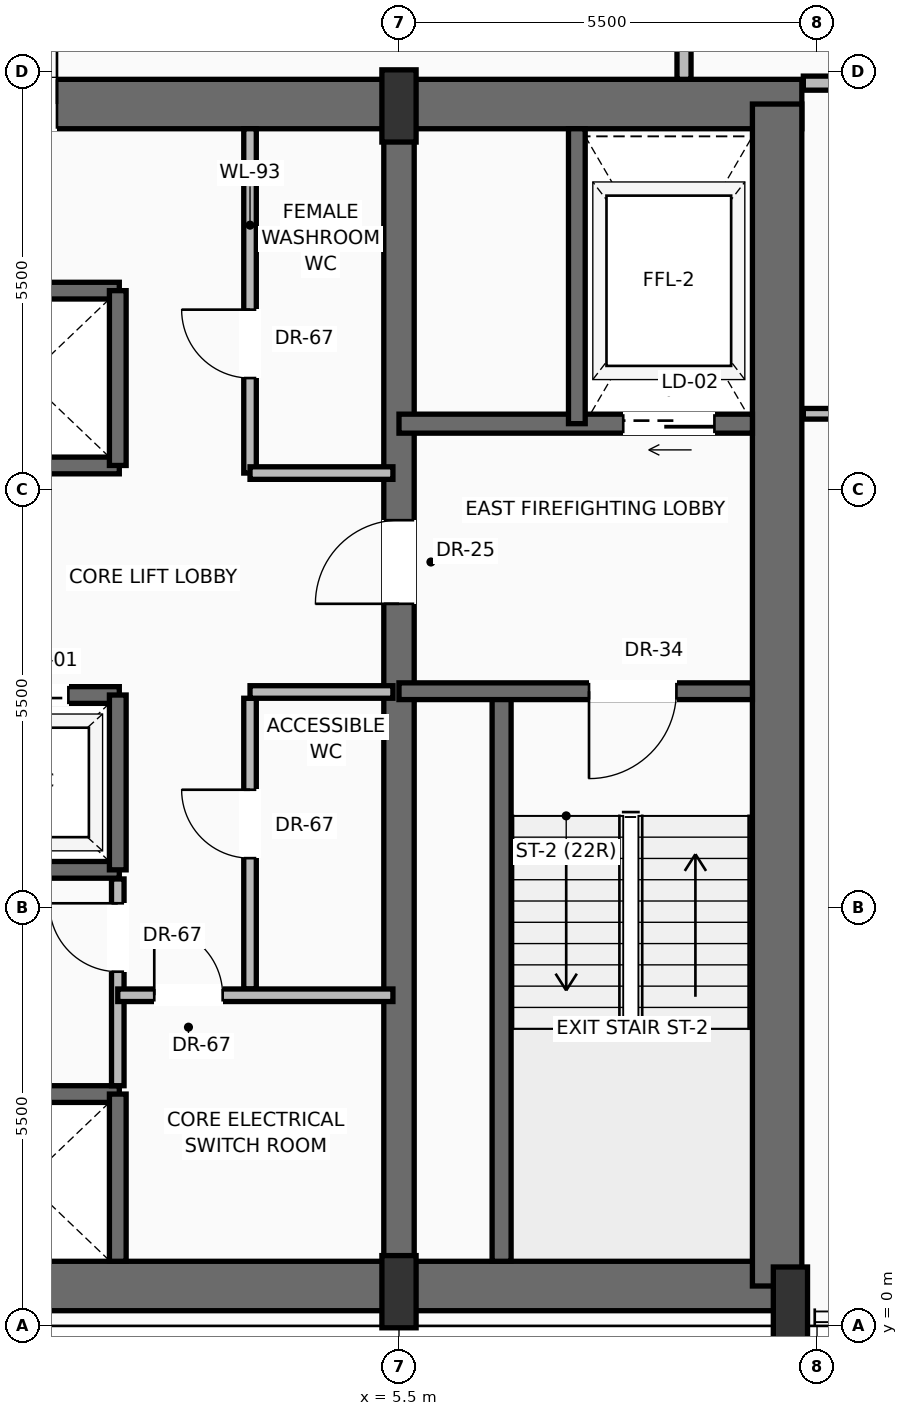
"""IFC4 building model, lengths in metres.
Left out: names, types, materials, properties, quantities, classifications, styles, units other than length and angle.
Written with IfcOpenShell. Run it as: python <this file> out.ifc"""

import sys

from ifc_helpers import new_model, si_unit, direction, frame, frame_2d, origin, origin_2d, place, context, subcontext, project, spatial, rectangle, extrude, source, transform, mapped, element, fill, save


model = new_model("IFC4")
c1 = context("Model", 3, precision=1e-05, world=origin(), true_north=direction((0.0, 1.0)))
c2 = subcontext(c1, "Body", "Model", "MODEL_VIEW")
j1 = project(units=[si_unit("LENGTHUNIT", "METRE"), si_unit("PLANEANGLEUNIT", "RADIAN")], contexts=[c1])
p1 = place(None, origin())
s1 = spatial("IfcSite", under=j1, at=p1, CompositionType="ELEMENT")
p2 = place(p1, origin())
s2 = spatial("IfcBuilding", under=s1, at=p2, CompositionType="ELEMENT")
p3 = place(p2, frame((0.0, 0.0, 125.6)))
s3 = spatial("IfcBuildingStorey", under=s2, at=p3, CompositionType="ELEMENT", Elevation=125.6)
p4 = place(p3, frame((-10.65, 0.525, 0.0), z_axis=(0.0, 0.0, 1.0), x_axis=(1.0, 0.0, 0.0)))
e1 = element("IfcWall", 1, at=p4, inside=s3, PredefinedType="SHEAR", context=c2, shape_type="SweptSolid", body=[
    extrude(rectangle(XDim=21.3, YDim=0.65, at=frame_2d((10.65, 0.0))), origin(), (0.0, 0.0, 1.0), 3.47),
])
p5 = place(p3, frame((-10.8, 16.075, 0.0), z_axis=(0.0, 0.0, 1.0), x_axis=(1.0, 0.0, 0.0)))
e2 = element("IfcWall", 2, at=p5, inside=s3, PredefinedType="SHEAR", context=c2, shape_type="SweptSolid", body=[
    extrude(rectangle(XDim=21.6, YDim=0.65, at=frame_2d((10.8, 0.0))), origin(), (0.0, 0.0, 1.0), 3.47),
])
p6 = place(p5, frame((3.37, 0.0, 0.0)))
e3 = element("IfcOpeningElement", 3, at=p6, cuts=e2, PredefinedType="OPENING", context=c2, shape_type="SweptSolid", body=[
    extrude(rectangle(XDim=1.3, YDim=2.3, at=frame_2d((0.65, 1.15))), frame((0.0, 0.335, 0.0), z_axis=(0.0, -1.0, 0.0), x_axis=(1.0, 0.0, 0.0)), (0.0, 0.0, 1.0), 0.67),
])
p7 = place(p5, frame((9.8, 0.0, 0.0)))
e4 = element("IfcOpeningElement", 4, at=p7, cuts=e2, PredefinedType="OPENING", context=c2, shape_type="SweptSolid", body=[
    extrude(rectangle(XDim=2.0, YDim=2.4, at=frame_2d((1.0, 1.2))), frame((0.0, 0.335, 0.0), z_axis=(0.0, -1.0, 0.0), x_axis=(1.0, 0.0, 0.0)), (0.0, 0.0, 1.0), 0.67),
])
p8 = place(p3, frame((10.475, 0.525, 0.0), z_axis=(0.0, 0.0, 1.0), x_axis=(0.0, 1.0, 0.0)))
e5 = element("IfcWall", 5, at=p8, inside=s3, PredefinedType="SHEAR", context=c2, shape_type="SweptSolid", body=[
    extrude(rectangle(XDim=15.55, YDim=0.65, at=frame_2d((7.775, 0.0))), origin(), (0.0, 0.0, 1.0), 3.47),
])
p9 = place(p3, frame((5.5, 0.525, 0.0), z_axis=(0.0, 0.0, 1.0), x_axis=(0.0, 1.0, 0.0)))
e6 = element("IfcWall", 6, at=p9, inside=s3, PredefinedType="SHEAR", context=c2, shape_type="SweptSolid", body=[
    extrude(rectangle(XDim=15.55, YDim=0.4, at=frame_2d((7.775, 0.0))), origin(), (0.0, 0.0, 1.0), 3.47),
])
p10 = place(p9, frame((8.975, 0.0, 0.0)))
e7 = element("IfcOpeningElement", 7, at=p10, cuts=e6, PredefinedType="OPENING", context=c2, shape_type="SweptSolid", body=[
    extrude(rectangle(XDim=1.1, YDim=2.2, at=frame_2d((0.55, 1.1))), frame((0.0, 0.21, 0.0), z_axis=(0.0, -1.0, 0.0), x_axis=(1.0, 0.0, 0.0)), (0.0, 0.0, 1.0), 0.42),
])
m1 = source(origin(), c2, "Body", "SweptSolid", [
    extrude(rectangle(XDim=0.45, YDim=0.95, at=origin_2d()), origin(), (0.0, 0.0, 1.0), 3.7),
])
for number, where, z_axis, x_axis in (
    (8, (5.5, 0.45, 0.0), (0.0, 0.0, 1.0), (1.0, 0.0, 0.0)),
    (9, (10.65, 0.3, 0.0), (0.0, 0.0, 1.0), (1.0, 0.0, 0.0)),
    (10, (5.5, 16.05, 0.0), (0.0, 0.0, 1.0), (1.0, 0.0, 0.0)),
):
    element("IfcColumn", number, at=place(p3, frame(where, z_axis=z_axis, x_axis=x_axis)), inside=s3, PredefinedType="PILASTER", context=c2, shape_type="MappedRepresentation", body=[
        mapped(m1, transform((0.0, 0.0, 0.0), scale=1.0)),
    ])
p11 = place(p3, frame((6.85, 0.85, 0.0), z_axis=(0.0, 0.0, 1.0), x_axis=(0.0, 1.0, 0.0)))
e11 = element("IfcWall", 11, at=p11, inside=s3, PredefinedType="SOLIDWALL", context=c2, shape_type="SweptSolid", body=[
    extrude(rectangle(XDim=7.5, YDim=0.25, at=frame_2d((3.75, 0.0))), origin(), (0.0, 0.0, 1.0), 3.47),
])
p12 = place(p3, frame((10.15, 8.35, 0.0), z_axis=(0.0, 0.0, 1.0), x_axis=(-1.0, 0.0, 0.0)))
e12 = element("IfcWall", 12, at=p12, inside=s3, PredefinedType="SOLIDWALL", context=c2, shape_type="SweptSolid", body=[
    extrude(rectangle(XDim=4.65, YDim=0.22, at=frame_2d((2.325, 0.0))), origin(), (0.0, 0.0, 1.0), 3.47),
])
p13 = place(p12, frame((1.0, 0.0, 0.0)))
e13 = element("IfcOpeningElement", 13, at=p13, cuts=e12, PredefinedType="OPENING", context=c2, shape_type="SweptSolid", body=[
    extrude(rectangle(XDim=1.15, YDim=2.2, at=frame_2d((0.575, 1.1))), frame((0.0, 0.12, 0.0), z_axis=(0.0, -1.0, 0.0), x_axis=(1.0, 0.0, 0.0)), (0.0, 0.0, 1.0), 0.24),
])
p14 = place(p3, frame((10.15, 11.87, 0.0), z_axis=(0.0, 0.0, 1.0), x_axis=(-1.0, 0.0, 0.0)))
e14 = element("IfcWall", 14, at=p14, inside=s3, PredefinedType="SOLIDWALL", context=c2, shape_type="SweptSolid", body=[
    extrude(rectangle(XDim=4.65, YDim=0.25, at=frame_2d((2.325, 0.0))), origin(), (0.0, 0.0, 1.0), 3.47),
])
p15 = place(p14, frame((0.5, 0.0, 0.0)))
e15 = element("IfcOpeningElement", 15, at=p15, cuts=e14, PredefinedType="OPENING", context=c2, shape_type="SweptSolid", body=[
    extrude(rectangle(XDim=1.2, YDim=2.25, at=frame_2d((0.6, 1.125))), frame((0.0, 0.135, 0.0), z_axis=(0.0, -1.0, 0.0), x_axis=(1.0, 0.0, 0.0)), (0.0, 0.0, 1.0), 0.27),
])
p16 = place(p3, frame((7.84, 11.87, 0.0), z_axis=(0.0, 0.0, 1.0), x_axis=(0.0, 1.0, 0.0)))
e16 = element("IfcWall", 16, at=p16, inside=s3, PredefinedType="SOLIDWALL", context=c2, shape_type="SweptSolid", body=[
    extrude(rectangle(XDim=3.88, YDim=0.22, at=frame_2d((1.94, 0.0))), origin(), (0.0, 0.0, 1.0), 3.47),
])
p17 = place(p3, frame((-5.5, 3.05, 0.0), z_axis=(0.0, 0.0, 1.0), x_axis=(1.0, 0.0, 0.0)))
e17 = element("IfcWall", 17, at=p17, inside=s3, PredefinedType="SOLIDWALL", context=c2, shape_type="SweptSolid", body=[
    extrude(rectangle(XDim=7.32, YDim=0.22, at=frame_2d((3.66, 0.0))), origin(), (0.0, 0.0, 1.0), 3.47),
])
p18 = place(p3, frame((1.8, 0.85, 0.0), z_axis=(0.0, 0.0, 1.0), x_axis=(0.0, 1.0, 0.0)))
e18 = element("IfcWall", 18, at=p18, inside=s3, PredefinedType="SOLIDWALL", context=c2, shape_type="SweptSolid", body=[
    extrude(rectangle(XDim=2.2, YDim=0.22, at=frame_2d((1.1, 0.0))), origin(), (0.0, 0.0, 1.0), 3.47),
])
p19 = place(p3, frame((1.8, 3.16, 0.0), z_axis=(0.0, 0.0, 1.0), x_axis=(0.0, 1.0, 0.0)))
e19 = element("IfcWall", 19, at=p19, inside=s3, PredefinedType="PARTITIONING", context=c2, shape_type="SweptSolid", body=[
    extrude(rectangle(XDim=2.72, YDim=0.165, at=frame_2d((1.36, 0.0))), origin(), (0.0, 0.0, 1.0), 3.462),
])
p20 = place(p19, frame((1.5, 0.0, 0.0)))
e20 = element("IfcOpeningElement", 20, at=p20, cuts=e19, PredefinedType="OPENING", context=c2, shape_type="SweptSolid", body=[
    extrude(rectangle(XDim=0.9, YDim=2.1, at=frame_2d((0.45, 1.05))), frame((0.0, 0.093, 0.0), z_axis=(0.0, -1.0, 0.0), x_axis=(1.0, 0.0, 0.0)), (0.0, 0.0, 1.0), 0.185),
])
p21 = place(p3, frame((3.54, 4.433, 0.0), z_axis=(0.0, 0.0, 1.0), x_axis=(0.0, 1.0, 0.0)))
e21 = element("IfcWall", 21, at=p21, inside=s3, PredefinedType="PARTITIONING", context=c2, shape_type="SweptSolid", body=[
    extrude(rectangle(XDim=3.825, YDim=0.165, at=frame_2d((1.913, 0.0))), origin(), (0.0, 0.0, 1.0), 3.462),
])
p22 = place(p21, frame((1.721, 0.0, 0.0)))
e22 = element("IfcOpeningElement", 22, at=p22, cuts=e21, PredefinedType="OPENING", context=c2, shape_type="SweptSolid", body=[
    extrude(rectangle(XDim=0.9, YDim=2.1, at=frame_2d((0.45, 1.05))), frame((0.0, 0.093, 0.0), z_axis=(0.0, -1.0, 0.0), x_axis=(1.0, 0.0, 0.0)), (0.0, 0.0, 1.0), 0.185),
])
p23 = place(p3, frame((3.54, 8.34, 0.0), z_axis=(0.0, 0.0, 1.0), x_axis=(1.0, 0.0, 0.0)))
e23 = element("IfcWall", 23, at=p23, inside=s3, PredefinedType="PARTITIONING", context=c2, shape_type="SweptSolid", body=[
    extrude(rectangle(XDim=1.88, YDim=0.165, at=frame_2d((0.94, 0.0))), origin(), (0.0, 0.0, 1.0), 3.462),
])
p24 = place(p3, frame((1.8, 4.35, 0.0), z_axis=(0.0, 0.0, 1.0), x_axis=(1.0, 0.0, 0.0)))
e24 = element("IfcWall", 24, at=p24, inside=s3, PredefinedType="PARTITIONING", context=c2, shape_type="SweptSolid", body=[
    extrude(rectangle(XDim=3.62, YDim=0.165, at=frame_2d((1.81, 0.0))), origin(), (0.0, 0.0, 1.0), 3.462),
])
p25 = place(p24, frame((0.48, 0.0, 0.0)))
e25 = element("IfcOpeningElement", 25, at=p25, cuts=e24, PredefinedType="OPENING", context=c2, shape_type="SweptSolid", body=[
    extrude(rectangle(XDim=0.9, YDim=2.1, at=frame_2d((0.45, 1.05))), frame((0.0, 0.093, 0.0), z_axis=(0.0, -1.0, 0.0), x_axis=(1.0, 0.0, 0.0)), (0.0, 0.0, 1.0), 0.185),
])
p26 = place(p3, frame((-5.5, 6.0, 0.0), z_axis=(0.0, 0.0, 1.0), x_axis=(1.0, 0.0, 0.0)))
e26 = element("IfcWall", 26, at=p26, inside=s3, PredefinedType="SOLIDWALL", context=c2, shape_type="SweptSolid", body=[
    extrude(rectangle(XDim=7.32, YDim=0.22, at=frame_2d((3.66, 0.0))), origin(), (0.0, 0.0, 1.0), 3.47),
])
p27 = place(p3, frame((-5.5, 8.3, 0.0), z_axis=(0.0, 0.0, 1.0), x_axis=(1.0, 0.0, 0.0)))
e27 = element("IfcWall", 27, at=p27, inside=s3, PredefinedType="SOLIDWALL", context=c2, shape_type="SweptSolid", body=[
    extrude(rectangle(XDim=7.32, YDim=0.22, at=frame_2d((3.66, 0.0))), origin(), (0.0, 0.0, 1.0), 3.47),
])
p28 = place(p27, frame((0.75, 0.0, 0.0)))
e28 = element("IfcOpeningElement", 28, at=p28, cuts=e27, PredefinedType="OPENING", context=c2, shape_type="SweptSolid", body=[
    extrude(rectangle(XDim=1.1, YDim=2.2, at=frame_2d((0.55, 1.1))), frame((0.0, 0.12, 0.0), z_axis=(0.0, -1.0, 0.0), x_axis=(1.0, 0.0, 0.0)), (0.0, 0.0, 1.0), 0.24),
])
p29 = place(p27, frame((3.15, 0.0, 0.0)))
e29 = element("IfcOpeningElement", 29, at=p29, cuts=e27, PredefinedType="OPENING", context=c2, shape_type="SweptSolid", body=[
    extrude(rectangle(XDim=1.1, YDim=2.2, at=frame_2d((0.55, 1.1))), frame((0.0, 0.12, 0.0), z_axis=(0.0, -1.0, 0.0), x_axis=(1.0, 0.0, 0.0)), (0.0, 0.0, 1.0), 0.24),
])
p30 = place(p27, frame((5.55, 0.0, 0.0)))
e30 = element("IfcOpeningElement", 30, at=p30, cuts=e27, PredefinedType="OPENING", context=c2, shape_type="SweptSolid", body=[
    extrude(rectangle(XDim=1.1, YDim=2.2, at=frame_2d((0.55, 1.1))), frame((0.0, 0.12, 0.0), z_axis=(0.0, -1.0, 0.0), x_axis=(1.0, 0.0, 0.0)), (0.0, 0.0, 1.0), 0.24),
])
p31 = place(p3, frame((1.8, 6.0, 0.0), z_axis=(0.0, 0.0, 1.0), x_axis=(0.0, 1.0, 0.0)))
e31 = element("IfcWall", 31, at=p31, inside=s3, PredefinedType="SOLIDWALL", context=c2, shape_type="SweptSolid", body=[
    extrude(rectangle(XDim=2.3, YDim=0.22, at=frame_2d((1.15, 0.0))), origin(), (0.0, 0.0, 1.0), 3.47),
])
for number, where, z_axis, x_axis in (
    (32, (-5.5, 11.32, 0.0), (0.0, 0.0, 1.0), (1.0, 0.0, 0.0)),
    (33, (-5.5, 13.62, 0.0), (0.0, 0.0, 1.0), (1.0, 0.0, 0.0)),
):
    element("IfcWall", number, at=place(p3, frame(where, z_axis=z_axis, x_axis=x_axis)), inside=s3, PredefinedType="SOLIDWALL", context=c2, shape_type="SweptSolid", body=[
        extrude(rectangle(XDim=7.32, YDim=0.22, at=frame_2d((3.66, 0.0))), origin(), (0.0, 0.0, 1.0), 3.47),
    ])
p32 = place(p3, frame((1.8, 11.32, 0.0), z_axis=(0.0, 0.0, 1.0), x_axis=(0.0, 1.0, 0.0)))
e34 = element("IfcWall", 34, at=p32, inside=s3, PredefinedType="SOLIDWALL", context=c2, shape_type="SweptSolid", body=[
    extrude(rectangle(XDim=2.3, YDim=0.22, at=frame_2d((1.15, 0.0))), origin(), (0.0, 0.0, 1.0), 3.47),
])
p33 = place(p3, frame((3.54, 11.22, 0.0), z_axis=(0.0, 0.0, 1.0), x_axis=(0.0, 1.0, 0.0)))
e35 = element("IfcWall", 35, at=p33, inside=s3, PredefinedType="PARTITIONING", context=c2, shape_type="SweptSolid", body=[
    extrude(rectangle(XDim=4.53, YDim=0.165, at=frame_2d((2.265, 0.0))), origin(), (0.0, 0.0, 1.0), 3.462),
])
p34 = place(p33, frame((1.25, 0.0, 0.0)))
e36 = element("IfcOpeningElement", 36, at=p34, cuts=e35, PredefinedType="OPENING", context=c2, shape_type="SweptSolid", body=[
    extrude(rectangle(XDim=0.9, YDim=2.1, at=frame_2d((0.45, 1.05))), frame((0.0, 0.093, 0.0), z_axis=(0.0, -1.0, 0.0), x_axis=(1.0, 0.0, 0.0)), (0.0, 0.0, 1.0), 0.185),
])
p35 = place(p3, frame((3.54, 11.22, 0.0), z_axis=(0.0, 0.0, 1.0), x_axis=(1.0, 0.0, 0.0)))
e37 = element("IfcWall", 37, at=p35, inside=s3, PredefinedType="PARTITIONING", context=c2, shape_type="SweptSolid", body=[
    extrude(rectangle(XDim=1.88, YDim=0.165, at=frame_2d((0.94, 0.0))), origin(), (0.0, 0.0, 1.0), 3.462),
])
p36 = place(p3, frame((9.25, 16.4, 0.0), z_axis=(0.0, 0.0, 1.0), x_axis=(0.0, 1.0, 0.0)))
e38 = element("IfcWall", 38, at=p36, inside=s3, PredefinedType="PARTITIONING", context=c2, shape_type="SweptSolid", body=[
    extrude(rectangle(XDim=9.0, YDim=0.185, at=frame_2d((4.5, 0.0))), origin(), (0.0, 0.0, 1.0), 2.846),
])
p37 = place(p36, frame((4.441, 0.0, 0.0)))
e39 = element("IfcOpeningElement", 39, at=p37, cuts=e38, PredefinedType="OPENING", context=c2, shape_type="SweptSolid", body=[
    extrude(rectangle(XDim=0.95, YDim=2.2, at=frame_2d((0.475, 1.1))), frame((0.0, 0.103, 0.0), z_axis=(0.0, -1.0, 0.0), x_axis=(1.0, 0.0, 0.0)), (0.0, 0.0, 1.0), 0.205),
])
p38 = place(p3, frame((10.82, 16.35, 0.0), z_axis=(0.0, 0.0, 1.0), x_axis=(1.0, 0.0, 0.0)))
e40 = element("IfcWall", 40, at=p38, inside=s3, PredefinedType="PARTITIONING", context=c2, shape_type="SweptSolid", body=[
    extrude(rectangle(XDim=11.588, YDim=0.185, at=frame_2d((5.794, 0.0))), origin(), (0.0, 0.0, 1.0), 3.462),
])
p39 = place(p38, frame((3.683, 0.0, 0.0)))
e41 = element("IfcOpeningElement", 41, at=p39, cuts=e40, PredefinedType="OPENING", context=c2, shape_type="SweptSolid", body=[
    extrude(rectangle(XDim=0.95, YDim=2.2, at=frame_2d((0.475, 1.1))), frame((0.0, 0.103, 0.0), z_axis=(0.0, -1.0, 0.0), x_axis=(1.0, 0.0, 0.0)), (0.0, 0.0, 1.0), 0.205),
])
p40 = place(p3, frame((10.82, 12.0, 0.0), z_axis=(0.0, 0.0, 1.0), x_axis=(1.0, 0.0, 0.0)))
e42 = element("IfcWall", 42, at=p40, inside=s3, PredefinedType="PARTITIONING", context=c2, shape_type="SweptSolid", body=[
    extrude(rectangle(XDim=14.369, YDim=0.14, at=frame_2d((7.185, 0.0))), origin(), (0.0, 0.0, 1.0), 3.462),
])
p41 = place(p40, frame((6.701, 0.0, 0.0)))
e43 = element("IfcOpeningElement", 43, at=p41, cuts=e42, PredefinedType="OPENING", context=c2, shape_type="SweptSolid", body=[
    extrude(rectangle(XDim=0.95, YDim=2.2, at=frame_2d((0.475, 1.1))), frame((0.0, 0.08, 0.0), z_axis=(0.0, -1.0, 0.0), x_axis=(1.0, 0.0, 0.0)), (0.0, 0.0, 1.0), 0.16),
])
m2 = source(origin(), c2, "Body", "SweptSolid", [
    extrude(rectangle(XDim=1.15, YDim=2.2, at=frame_2d((0.575, 1.1))), frame((0.0, 0.025, 0.0), z_axis=(0.0, -1.0, 0.0), x_axis=(1.0, 0.0, 0.0)), (0.0, 0.0, 1.0), 0.05),
])
p42 = place(p13, origin())
e44 = element("IfcDoor", 44, at=p42, inside=s3, OperationType="SINGLE_SWING_RIGHT", PredefinedType="DOOR", context=c2, shape_type="MappedRepresentation", body=[
    mapped(m2, transform((0.0, 0.0, 0.0), scale=1.0)),
])
fill(e13, e44)
m3 = source(origin(), c2, "Body", "SweptSolid", [
    extrude(rectangle(XDim=1.1, YDim=2.2, at=frame_2d((0.55, 1.1))), frame((0.0, 0.025, 0.0), z_axis=(0.0, -1.0, 0.0), x_axis=(1.0, 0.0, 0.0)), (0.0, 0.0, 1.0), 0.05),
])
p43 = place(p10, origin())
e45 = element("IfcDoor", 45, at=p43, inside=s3, OperationType="SINGLE_SWING_LEFT", PredefinedType="DOOR", context=c2, shape_type="MappedRepresentation", body=[
    mapped(m3, transform((0.0, 0.0, 0.0), scale=1.0)),
])
fill(e7, e45)
m4 = source(origin(), c2, "Body", "SweptSolid", [
    extrude(rectangle(XDim=1.2, YDim=2.25, at=frame_2d((0.6, 1.125))), frame((0.0, 0.025, 0.0), z_axis=(0.0, -1.0, 0.0), x_axis=(1.0, 0.0, 0.0)), (0.0, 0.0, 1.0), 0.05),
])
p44 = place(p15, origin())
e46 = element("IfcDoor", 46, at=p44, inside=s3, OperationType="SLIDING_TO_RIGHT", PredefinedType="DOOR", context=c2, shape_type="MappedRepresentation", body=[
    mapped(m4, transform((0.0, 0.0, 0.0), scale=1.0)),
])
fill(e15, e46)
m5 = source(origin(), c2, "Body", "SweptSolid", [
    extrude(rectangle(XDim=2.0, YDim=2.4, at=frame_2d((1.0, 1.2))), frame((0.0, 0.025, 0.0), z_axis=(0.0, -1.0, 0.0), x_axis=(1.0, 0.0, 0.0)), (0.0, 0.0, 1.0), 0.05),
])
p45 = place(p7, origin())
e47 = element("IfcDoor", 47, at=p45, inside=s3, OperationType="DOUBLE_DOOR_SINGLE_SWING", PredefinedType="DOOR", context=c2, shape_type="MappedRepresentation", body=[
    mapped(m5, transform((0.0, 0.0, 0.0), scale=1.0)),
])
fill(e4, e47)
m6 = source(origin(), c2, "Body", "SweptSolid", [
    extrude(rectangle(XDim=0.9, YDim=2.1, at=frame_2d((0.45, 1.05))), frame((0.0, 0.025, 0.0), z_axis=(0.0, -1.0, 0.0), x_axis=(1.0, 0.0, 0.0)), (0.0, 0.0, 1.0), 0.05),
])
p46 = place(p20, origin())
e48 = element("IfcDoor", 48, at=p46, inside=s3, OperationType="SINGLE_SWING_RIGHT", PredefinedType="DOOR", context=c2, shape_type="MappedRepresentation", body=[
    mapped(m6, transform((0.0, 0.0, 0.0), scale=1.0)),
])
fill(e20, e48)
p47 = place(p25, origin())
e49 = element("IfcDoor", 49, at=p47, inside=s3, OperationType="SINGLE_SWING_LEFT", PredefinedType="DOOR", context=c2, shape_type="MappedRepresentation", body=[
    mapped(m6, transform((0.0, 0.0, 0.0), scale=1.0)),
])
fill(e25, e49)
p48 = place(p22, origin())
e50 = element("IfcDoor", 50, at=p48, inside=s3, OperationType="SINGLE_SWING_RIGHT", PredefinedType="DOOR", context=c2, shape_type="MappedRepresentation", body=[
    mapped(m6, transform((0.0, 0.0, 0.0), scale=1.0)),
])
fill(e22, e50)
m7 = source(origin(), c2, "Body", "SweptSolid", [
    extrude(rectangle(XDim=1.1, YDim=2.2, at=frame_2d((0.55, 1.1))), frame((0.0, 0.025, 0.0), z_axis=(0.0, -1.0, 0.0), x_axis=(1.0, 0.0, 0.0)), (0.0, 0.0, 1.0), 0.05),
])
p49 = place(p30, origin())
e51 = element("IfcDoor", 51, at=p49, inside=s3, OperationType="SLIDING_TO_LEFT", PredefinedType="DOOR", context=c2, shape_type="MappedRepresentation", body=[
    mapped(m7, transform((0.0, 0.0, 0.0), scale=1.0)),
])
fill(e30, e51)
p50 = place(p34, origin())
e52 = element("IfcDoor", 52, at=p50, inside=s3, OperationType="SINGLE_SWING_RIGHT", PredefinedType="DOOR", context=c2, shape_type="MappedRepresentation", body=[
    mapped(m6, transform((0.0, 0.0, 0.0), scale=1.0)),
])
fill(e36, e52)
save(model, sys.argv[1])
